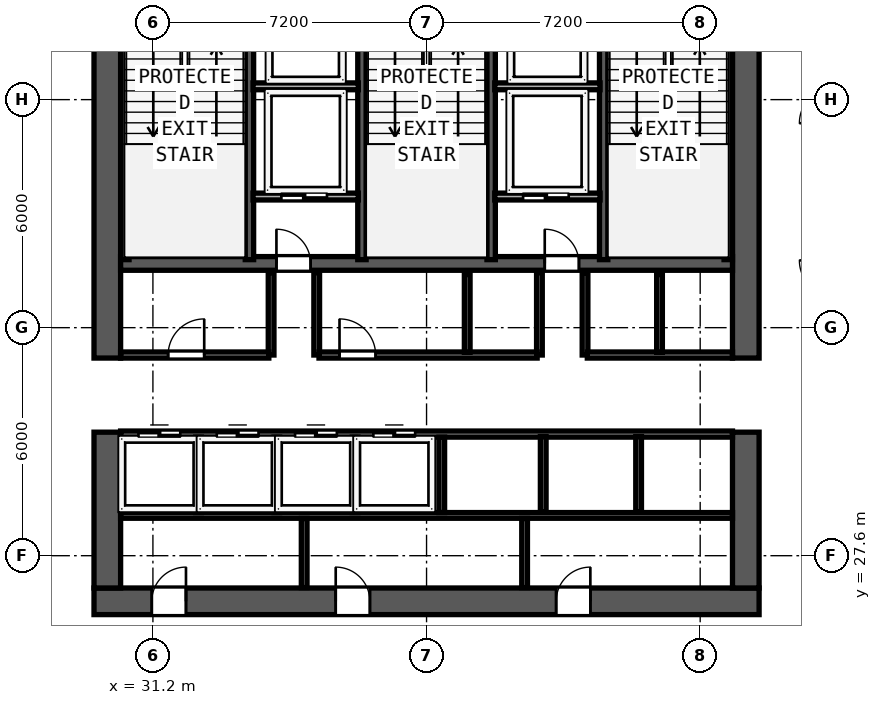
"""IFC4 building model, lengths in metres.
Left out: names, types, materials, properties, quantities, classifications, styles, units other than length and angle.
Written with IfcOpenShell. Run it as: python <this file> out.ifc"""

import sys

from ifc_helpers import new_model, si_unit, direction, frame, frame_2d, origin, place, context, subcontext, project, spatial, rectangle, extrude, element, fill, save


model = new_model("IFC4")
c1 = context("Model", 3, precision=1e-05, world=origin(), true_north=direction((0.0, 1.0)))
c2 = subcontext(c1, "Body", "Model", "MODEL_VIEW")
j1 = project(units=[si_unit("LENGTHUNIT", "METRE"), si_unit("PLANEANGLEUNIT", "RADIAN")], contexts=[c1])
p1 = place(None, origin())
s1 = spatial("IfcSite", under=j1, at=p1, CompositionType="ELEMENT")
p2 = place(p1, origin())
s2 = spatial("IfcBuilding", under=s1, at=p2, CompositionType="ELEMENT")
p3 = place(p2, frame((0.0, 0.0, 144.8)))
s3 = spatial("IfcBuildingStorey", under=s2, at=p3, CompositionType="ELEMENT", Elevation=144.8)
p4 = place(p3, frame((29.65, 26.4, 0.0), z_axis=(0.0, 0.0, 1.0), x_axis=(1.0, 0.0, 0.0)))
e1 = element("IfcWall", 1, at=p4, inside=s3, PredefinedType="SHEAR", context=c2, shape_type="SweptSolid", body=[
    extrude(rectangle(XDim=17.5, YDim=0.7, at=frame_2d((8.75, 0.0))), origin(), (0.0, 0.0, 1.0), 3.6),
])
p5 = place(p4, frame((2.42, 0.0, 0.0), z_axis=(0.0, 0.0, 1.0), x_axis=(-1.0, 0.0, 0.0)))
e2 = element("IfcOpeningElement", 2, at=p5, cuts=e1, PredefinedType="OPENING", context=c2, shape_type="SweptSolid", body=[
    extrude(rectangle(XDim=0.9, YDim=2.1, at=frame_2d((0.45, 1.05))), frame((0.0, 0.36, 0.0), z_axis=(0.0, -1.0, 0.0), x_axis=(1.0, 0.0, 0.0)), (0.0, 0.0, 1.0), 0.72),
])
p6 = place(p4, frame((7.26, 0.0, 0.0), z_axis=(0.0, 0.0, 1.0), x_axis=(-1.0, 0.0, 0.0)))
e3 = element("IfcOpeningElement", 3, at=p6, cuts=e1, PredefinedType="OPENING", context=c2, shape_type="SweptSolid", body=[
    extrude(rectangle(XDim=0.9, YDim=2.1, at=frame_2d((0.45, 1.05))), frame((0.0, 0.36, 0.0), z_axis=(0.0, -1.0, 0.0), x_axis=(1.0, 0.0, 0.0)), (0.0, 0.0, 1.0), 0.72),
])
p7 = place(p4, frame((13.06, 0.0, 0.0), z_axis=(0.0, 0.0, 1.0), x_axis=(-1.0, 0.0, 0.0)))
e4 = element("IfcOpeningElement", 4, at=p7, cuts=e1, PredefinedType="OPENING", context=c2, shape_type="SweptSolid", body=[
    extrude(rectangle(XDim=0.9, YDim=2.1, at=frame_2d((0.45, 1.05))), frame((0.0, 0.36, 0.0), z_axis=(0.0, -1.0, 0.0), x_axis=(1.0, 0.0, 0.0)), (0.0, 0.0, 1.0), 0.72),
])
p8 = place(p3, frame((30.0, 26.75, 0.0), z_axis=(0.0, 0.0, 1.0), x_axis=(0.0, 1.0, 0.0)))
e5 = element("IfcWall", 5, at=p8, inside=s3, PredefinedType="SHEAR", context=c2, shape_type="SweptSolid", body=[
    extrude(rectangle(XDim=4.1, YDim=0.7, at=frame_2d((2.05, 0.0))), origin(), (0.0, 0.0, 1.0), 3.6),
])
p9 = place(p3, frame((30.0, 32.8, 0.0), z_axis=(0.0, 0.0, 1.0), x_axis=(0.0, 1.0, 0.0)))
e6 = element("IfcWall", 6, at=p9, inside=s3, PredefinedType="SHEAR", context=c2, shape_type="SweptSolid", body=[
    extrude(rectangle(XDim=10.05, YDim=0.7, at=frame_2d((5.025, 0.0))), origin(), (0.0, 0.0, 1.0), 3.6),
])
p10 = place(p3, frame((46.8, 26.75, 0.0), z_axis=(0.0, 0.0, 1.0), x_axis=(0.0, 1.0, 0.0)))
e7 = element("IfcWall", 7, at=p10, inside=s3, PredefinedType="SHEAR", context=c2, shape_type="SweptSolid", body=[
    extrude(rectangle(XDim=4.1, YDim=0.7, at=frame_2d((2.05, 0.0))), origin(), (0.0, 0.0, 1.0), 3.6),
])
p11 = place(p3, frame((46.8, 32.8, 0.0), z_axis=(0.0, 0.0, 1.0), x_axis=(0.0, 1.0, 0.0)))
e8 = element("IfcWall", 8, at=p11, inside=s3, PredefinedType="SHEAR", context=c2, shape_type="SweptSolid", body=[
    extrude(rectangle(XDim=10.05, YDim=0.7, at=frame_2d((5.025, 0.0))), origin(), (0.0, 0.0, 1.0), 3.6),
])
p12 = place(p3, frame((30.35, 35.29, 0.0), z_axis=(0.0, 0.0, 1.0), x_axis=(1.0, 0.0, 0.0)))
e9 = element("IfcWall", 9, at=p12, inside=s3, PredefinedType="SHEAR", context=c2, shape_type="SweptSolid", body=[
    extrude(rectangle(XDim=16.1, YDim=0.36, at=frame_2d((8.05, 0.0))), origin(), (0.0, 0.0, 1.0), 3.6),
])
p13 = place(p12, frame((5.0, 0.0, 0.0), z_axis=(0.0, 0.0, 1.0), x_axis=(-1.0, 0.0, 0.0)))
e10 = element("IfcOpeningElement", 10, at=p13, cuts=e9, PredefinedType="OPENING", context=c2, shape_type="SweptSolid", body=[
    extrude(rectangle(XDim=0.9, YDim=2.1, at=frame_2d((0.45, 1.05))), frame((0.0, 0.19, 0.0), z_axis=(0.0, -1.0, 0.0), x_axis=(1.0, 0.0, 0.0)), (0.0, 0.0, 1.0), 0.38),
])
p14 = place(p12, frame((12.06, 0.0, 0.0), z_axis=(0.0, 0.0, 1.0), x_axis=(-1.0, 0.0, 0.0)))
e11 = element("IfcOpeningElement", 11, at=p14, cuts=e9, PredefinedType="OPENING", context=c2, shape_type="SweptSolid", body=[
    extrude(rectangle(XDim=0.9, YDim=2.1, at=frame_2d((0.45, 1.05))), frame((0.0, 0.19, 0.0), z_axis=(0.0, -1.0, 0.0), x_axis=(1.0, 0.0, 0.0)), (0.0, 0.0, 1.0), 0.38),
])
for number, where, z_axis, x_axis in (
    (12, (30.462, 35.39, 0.0), (0.0, 0.0, 1.0), (0.0, 1.0, 0.0)),
    (13, (33.74, 35.39, 0.0), (0.0, 0.0, 1.0), (0.0, 1.0, 0.0)),
    (14, (36.7, 35.39, 0.0), (0.0, 0.0, 1.0), (0.0, 1.0, 0.0)),
    (15, (40.1, 35.39, 0.0), (0.0, 0.0, 1.0), (0.0, 1.0, 0.0)),
    (16, (43.06, 35.39, 0.0), (0.0, 0.0, 1.0), (0.0, 1.0, 0.0)),
    (17, (46.338, 35.39, 0.0), (0.0, 0.0, 1.0), (0.0, 1.0, 0.0)),
):
    element("IfcWall", number, at=place(p3, frame(where, z_axis=z_axis, x_axis=x_axis)), inside=s3, PredefinedType="SHEAR", context=c2, shape_type="SweptSolid", body=[
        extrude(rectangle(XDim=7.46, YDim=0.22, at=frame_2d((3.73, 0.0))), origin(), (0.0, 0.0, 1.0), 3.6),
    ])
for number, where, z_axis, x_axis in (
    (18, (33.835, 39.95, 0.0), (0.0, 0.0, 1.0), (1.0, 0.0, 0.0)),
    (19, (40.195, 39.95, 0.0), (0.0, 0.0, 1.0), (1.0, 0.0, 0.0)),
):
    element("IfcWall", number, at=place(p3, frame(where, z_axis=z_axis, x_axis=x_axis)), inside=s3, PredefinedType="SOLIDWALL", context=c2, shape_type="SweptSolid", body=[
        extrude(rectangle(XDim=2.77, YDim=0.18, at=frame_2d((1.385, 0.0))), origin(), (0.0, 0.0, 1.0), 3.6),
    ])
p15 = place(p3, frame((33.835, 37.05, 0.0), z_axis=(0.0, 0.0, 1.0), x_axis=(1.0, 0.0, 0.0)))
e20 = element("IfcWall", 20, at=p15, inside=s3, PredefinedType="SOLIDWALL", context=c2, shape_type="SweptSolid", body=[
    extrude(rectangle(XDim=2.77, YDim=0.18, at=frame_2d((1.385, 0.0))), origin(), (0.0, 0.0, 1.0), 3.6),
])
p16 = place(p15, frame((1.945, 0.0, 0.0), z_axis=(0.0, 0.0, 1.0), x_axis=(-1.0, 0.0, 0.0)))
e21 = element("IfcOpeningElement", 21, at=p16, cuts=e20, PredefinedType="OPENING", context=c2, shape_type="SweptSolid", body=[
    extrude(rectangle(XDim=1.2, YDim=2.2, at=frame_2d((0.6, 1.1))), frame((0.0, 0.1, 0.0), z_axis=(0.0, -1.0, 0.0), x_axis=(1.0, 0.0, 0.0)), (0.0, 0.0, 1.0), 0.2),
])
for number, where, z_axis, x_axis in (
    (22, (34.31, 32.88, 0.0), (0.0, 0.0, 1.0), (0.0, 1.0, 0.0)),
    (23, (35.51, 32.88, 0.0), (0.0, 0.0, 1.0), (0.0, 1.0, 0.0)),
):
    element("IfcWall", number, at=place(p3, frame(where, z_axis=z_axis, x_axis=x_axis)), inside=s3, PredefinedType="SOLIDWALL", context=c2, shape_type="SweptSolid", body=[
        extrude(rectangle(XDim=2.17, YDim=0.15, at=frame_2d((1.085, 0.0))), origin(), (0.0, 0.0, 1.0), 3.6),
    ])
p17 = place(p3, frame((40.195, 37.05, 0.0), z_axis=(0.0, 0.0, 1.0), x_axis=(1.0, 0.0, 0.0)))
e24 = element("IfcWall", 24, at=p17, inside=s3, PredefinedType="SOLIDWALL", context=c2, shape_type="SweptSolid", body=[
    extrude(rectangle(XDim=2.77, YDim=0.18, at=frame_2d((1.385, 0.0))), origin(), (0.0, 0.0, 1.0), 3.6),
])
p18 = place(p17, frame((1.945, 0.0, 0.0), z_axis=(0.0, 0.0, 1.0), x_axis=(-1.0, 0.0, 0.0)))
e25 = element("IfcOpeningElement", 25, at=p18, cuts=e24, PredefinedType="OPENING", context=c2, shape_type="SweptSolid", body=[
    extrude(rectangle(XDim=1.2, YDim=2.2, at=frame_2d((0.6, 1.1))), frame((0.0, 0.1, 0.0), z_axis=(0.0, -1.0, 0.0), x_axis=(1.0, 0.0, 0.0)), (0.0, 0.0, 1.0), 0.2),
])
for number, where, z_axis, x_axis in (
    (26, (41.37, 32.88, 0.0), (0.0, 0.0, 1.0), (0.0, 1.0, 0.0)),
    (27, (42.57, 32.88, 0.0), (0.0, 0.0, 1.0), (0.0, 1.0, 0.0)),
):
    element("IfcWall", number, at=place(p3, frame(where, z_axis=z_axis, x_axis=x_axis)), inside=s3, PredefinedType="SOLIDWALL", context=c2, shape_type="SweptSolid", body=[
        extrude(rectangle(XDim=2.17, YDim=0.15, at=frame_2d((1.085, 0.0))), origin(), (0.0, 0.0, 1.0), 3.6),
    ])
p19 = place(p3, frame((30.35, 32.88, 0.0), z_axis=(0.0, 0.0, 1.0), x_axis=(1.0, 0.0, 0.0)))
e28 = element("IfcWall", 28, at=p19, inside=s3, PredefinedType="SOLIDWALL", context=c2, shape_type="SweptSolid", body=[
    extrude(rectangle(XDim=3.9, YDim=0.16, at=frame_2d((1.95, 0.0))), origin(), (0.0, 0.0, 1.0), 3.6),
])
p20 = place(p19, frame((2.2, 0.0, 0.0), z_axis=(0.0, 0.0, 1.0), x_axis=(-1.0, 0.0, 0.0)))
e29 = element("IfcOpeningElement", 29, at=p20, cuts=e28, PredefinedType="OPENING", context=c2, shape_type="SweptSolid", body=[
    extrude(rectangle(XDim=0.95, YDim=2.12, at=frame_2d((0.475, 1.06))), frame((0.0, 0.09, 0.0), z_axis=(0.0, -1.0, 0.0), x_axis=(1.0, 0.0, 0.0)), (0.0, 0.0, 1.0), 0.18),
])
p21 = place(p3, frame((35.57, 32.88, 0.0), z_axis=(0.0, 0.0, 1.0), x_axis=(1.0, 0.0, 0.0)))
e30 = element("IfcWall", 30, at=p21, inside=s3, PredefinedType="SOLIDWALL", context=c2, shape_type="SweptSolid", body=[
    extrude(rectangle(XDim=5.74, YDim=0.16, at=frame_2d((2.87, 0.0))), origin(), (0.0, 0.0, 1.0), 3.6),
])
p22 = place(p21, frame((1.49, 0.0, 0.0), z_axis=(0.0, 0.0, 1.0), x_axis=(-1.0, 0.0, 0.0)))
e31 = element("IfcOpeningElement", 31, at=p22, cuts=e30, PredefinedType="OPENING", context=c2, shape_type="SweptSolid", body=[
    extrude(rectangle(XDim=0.95, YDim=2.12, at=frame_2d((0.475, 1.06))), frame((0.0, 0.09, 0.0), z_axis=(0.0, -1.0, 0.0), x_axis=(1.0, 0.0, 0.0)), (0.0, 0.0, 1.0), 0.18),
])
p23 = place(p3, frame((42.63, 32.88, 0.0), z_axis=(0.0, 0.0, 1.0), x_axis=(1.0, 0.0, 0.0)))
e32 = element("IfcWall", 32, at=p23, inside=s3, PredefinedType="SOLIDWALL", context=c2, shape_type="SweptSolid", body=[
    extrude(rectangle(XDim=3.82, YDim=0.16, at=frame_2d((1.91, 0.0))), origin(), (0.0, 0.0, 1.0), 3.6),
])
for number, where, z_axis, x_axis in (
    (33, (39.47, 32.95, 0.0), (0.0, 0.0, 1.0), (0.0, 1.0, 0.0)),
    (34, (44.53, 32.95, 0.0), (0.0, 0.0, 1.0), (0.0, 1.0, 0.0)),
):
    element("IfcWall", number, at=place(p3, frame(where, z_axis=z_axis, x_axis=x_axis)), inside=s3, PredefinedType="SOLIDWALL", context=c2, shape_type="SweptSolid", body=[
        extrude(rectangle(XDim=2.05, YDim=0.15, at=frame_2d((1.025, 0.0))), origin(), (0.0, 0.0, 1.0), 3.6),
    ])
p24 = place(p3, frame((30.35, 30.8, 0.0), z_axis=(0.0, 0.0, 1.0), x_axis=(1.0, 0.0, 0.0)))
e35 = element("IfcWall", 35, at=p24, inside=s3, PredefinedType="SOLIDWALL", context=c2, shape_type="SweptSolid", body=[
    extrude(rectangle(XDim=16.1, YDim=0.16, at=frame_2d((8.05, 0.0))), origin(), (0.0, 0.0, 1.0), 3.6),
])
p25 = place(p24, frame((0.47, 0.0, 0.0)))
e36 = element("IfcOpeningElement", 36, at=p25, cuts=e35, PredefinedType="OPENING", context=c2, shape_type="SweptSolid", body=[
    extrude(rectangle(XDim=1.1, YDim=2.2, at=frame_2d((0.55, 1.1))), frame((0.0, 0.09, 0.0), z_axis=(0.0, -1.0, 0.0), x_axis=(1.0, 0.0, 0.0)), (0.0, 0.0, 1.0), 0.18),
])
p26 = place(p24, frame((2.53, 0.0, 0.0)))
e37 = element("IfcOpeningElement", 37, at=p26, cuts=e35, PredefinedType="OPENING", context=c2, shape_type="SweptSolid", body=[
    extrude(rectangle(XDim=1.1, YDim=2.2, at=frame_2d((0.55, 1.1))), frame((0.0, 0.09, 0.0), z_axis=(0.0, -1.0, 0.0), x_axis=(1.0, 0.0, 0.0)), (0.0, 0.0, 1.0), 0.18),
])
p27 = place(p24, frame((4.59, 0.0, 0.0)))
e38 = element("IfcOpeningElement", 38, at=p27, cuts=e35, PredefinedType="OPENING", context=c2, shape_type="SweptSolid", body=[
    extrude(rectangle(XDim=1.1, YDim=2.2, at=frame_2d((0.55, 1.1))), frame((0.0, 0.09, 0.0), z_axis=(0.0, -1.0, 0.0), x_axis=(1.0, 0.0, 0.0)), (0.0, 0.0, 1.0), 0.18),
])
p28 = place(p24, frame((6.65, 0.0, 0.0)))
e39 = element("IfcOpeningElement", 39, at=p28, cuts=e35, PredefinedType="OPENING", context=c2, shape_type="SweptSolid", body=[
    extrude(rectangle(XDim=1.1, YDim=2.2, at=frame_2d((0.55, 1.1))), frame((0.0, 0.09, 0.0), z_axis=(0.0, -1.0, 0.0), x_axis=(1.0, 0.0, 0.0)), (0.0, 0.0, 1.0), 0.18),
])
p29 = place(p3, frame((30.35, 28.66, 0.0), z_axis=(0.0, 0.0, 1.0), x_axis=(1.0, 0.0, 0.0)))
e40 = element("IfcWall", 40, at=p29, inside=s3, PredefinedType="PARTITIONING", context=c2, shape_type="SweptSolid", body=[
    extrude(rectangle(XDim=16.1, YDim=0.15, at=frame_2d((8.05, 0.0))), origin(), (0.0, 0.0, 1.0), 3.6),
])
for number, where, z_axis, x_axis in (
    (41, (32.4, 28.735, 0.0), (0.0, 0.0, 1.0), (0.0, 1.0, 0.0)),
    (42, (34.46, 28.735, 0.0), (0.0, 0.0, 1.0), (0.0, 1.0, 0.0)),
    (43, (36.52, 28.735, 0.0), (0.0, 0.0, 1.0), (0.0, 1.0, 0.0)),
    (44, (38.8, 28.735, 0.0), (0.0, 0.0, 1.0), (0.0, 1.0, 0.0)),
):
    element("IfcWall", number, at=place(p3, frame(where, z_axis=z_axis, x_axis=x_axis)), inside=s3, PredefinedType="SOLIDWALL", context=c2, shape_type="SweptSolid", body=[
        extrude(rectangle(XDim=1.985, YDim=0.15, at=frame_2d((0.992, 0.0))), origin(), (0.0, 0.0, 1.0), 3.6),
    ])
for number, where, z_axis, x_axis in (
    (45, (35.18, 26.76, 0.0), (0.0, 0.0, 1.0), (0.0, 1.0, 0.0)),
    (46, (40.98, 26.76, 0.0), (0.0, 0.0, 1.0), (0.0, 1.0, 0.0)),
):
    element("IfcWall", number, at=place(p3, frame(where, z_axis=z_axis, x_axis=x_axis)), inside=s3, PredefinedType="PARTITIONING", context=c2, shape_type="SweptSolid", body=[
        extrude(rectangle(XDim=1.82, YDim=0.15, at=frame_2d((0.91, 0.0))), origin(), (0.0, 0.0, 1.0), 3.6),
    ])
for number, where, z_axis, x_axis in (
    (47, (41.47, 28.75, 0.0), (0.0, 0.0, 1.0), (0.0, 1.0, 0.0)),
    (48, (43.98, 28.75, 0.0), (0.0, 0.0, 1.0), (0.0, 1.0, 0.0)),
):
    element("IfcWall", number, at=place(p3, frame(where, z_axis=z_axis, x_axis=x_axis)), inside=s3, PredefinedType="SOLIDWALL", context=c2, shape_type="SweptSolid", body=[
        extrude(rectangle(XDim=1.985, YDim=0.15, at=frame_2d((0.993, 0.0))), origin(), (0.0, 0.0, 1.0), 3.6),
    ])
p30 = place(p16, origin())
e49 = element("IfcDoor", 49, at=p30, inside=s3, OperationType="SLIDING_TO_RIGHT", PredefinedType="DOOR", context=c2, shape_type="SweptSolid", body=[
    extrude(rectangle(XDim=1.2, YDim=2.2, at=frame_2d((0.6, 1.1))), frame((0.0, 0.025, 0.0), z_axis=(0.0, -1.0, 0.0), x_axis=(1.0, 0.0, 0.0)), (0.0, 0.0, 1.0), 0.05),
])
fill(e21, e49)
p31 = place(p13, origin())
e50 = element("IfcDoor", 50, at=p31, inside=s3, OperationType="SINGLE_SWING_RIGHT", PredefinedType="DOOR", context=c2, shape_type="SweptSolid", body=[
    extrude(rectangle(XDim=0.9, YDim=2.1, at=frame_2d((0.45, 1.05))), frame((0.0, 0.025, 0.0), z_axis=(0.0, -1.0, 0.0), x_axis=(1.0, 0.0, 0.0)), (0.0, 0.0, 1.0), 0.05),
])
fill(e10, e50)
p32 = place(p18, origin())
e51 = element("IfcDoor", 51, at=p32, inside=s3, OperationType="SLIDING_TO_RIGHT", PredefinedType="DOOR", context=c2, shape_type="SweptSolid", body=[
    extrude(rectangle(XDim=1.2, YDim=2.2, at=frame_2d((0.6, 1.1))), frame((0.0, 0.025, 0.0), z_axis=(0.0, -1.0, 0.0), x_axis=(1.0, 0.0, 0.0)), (0.0, 0.0, 1.0), 0.05),
])
fill(e25, e51)
p33 = place(p14, origin())
e52 = element("IfcDoor", 52, at=p33, inside=s3, OperationType="SINGLE_SWING_RIGHT", PredefinedType="DOOR", context=c2, shape_type="SweptSolid", body=[
    extrude(rectangle(XDim=0.9, YDim=2.1, at=frame_2d((0.45, 1.05))), frame((0.0, 0.025, 0.0), z_axis=(0.0, -1.0, 0.0), x_axis=(1.0, 0.0, 0.0)), (0.0, 0.0, 1.0), 0.05),
])
fill(e11, e52)
p34 = place(p20, origin())
e53 = element("IfcDoor", 53, at=p34, inside=s3, OperationType="SINGLE_SWING_LEFT", PredefinedType="DOOR", context=c2, shape_type="SweptSolid", body=[
    extrude(rectangle(XDim=0.95, YDim=2.12, at=frame_2d((0.475, 1.06))), frame((0.0, 0.025, 0.0), z_axis=(0.0, -1.0, 0.0), x_axis=(1.0, 0.0, 0.0)), (0.0, 0.0, 1.0), 0.05),
])
fill(e29, e53)
p35 = place(p22, origin())
e54 = element("IfcDoor", 54, at=p35, inside=s3, OperationType="SINGLE_SWING_RIGHT", PredefinedType="DOOR", context=c2, shape_type="SweptSolid", body=[
    extrude(rectangle(XDim=0.95, YDim=2.12, at=frame_2d((0.475, 1.06))), frame((0.0, 0.025, 0.0), z_axis=(0.0, -1.0, 0.0), x_axis=(1.0, 0.0, 0.0)), (0.0, 0.0, 1.0), 0.05),
])
fill(e31, e54)
p36 = place(p25, origin())
e55 = element("IfcDoor", 55, at=p36, inside=s3, OperationType="SLIDING_TO_LEFT", PredefinedType="DOOR", context=c2, shape_type="SweptSolid", body=[
    extrude(rectangle(XDim=1.1, YDim=2.2, at=frame_2d((0.55, 1.1))), frame((0.0, 0.025, 0.0), z_axis=(0.0, -1.0, 0.0), x_axis=(1.0, 0.0, 0.0)), (0.0, 0.0, 1.0), 0.05),
])
fill(e36, e55)
p37 = place(p26, origin())
e56 = element("IfcDoor", 56, at=p37, inside=s3, OperationType="SLIDING_TO_LEFT", PredefinedType="DOOR", context=c2, shape_type="SweptSolid", body=[
    extrude(rectangle(XDim=1.1, YDim=2.2, at=frame_2d((0.55, 1.1))), frame((0.0, 0.025, 0.0), z_axis=(0.0, -1.0, 0.0), x_axis=(1.0, 0.0, 0.0)), (0.0, 0.0, 1.0), 0.05),
])
fill(e37, e56)
p38 = place(p27, origin())
e57 = element("IfcDoor", 57, at=p38, inside=s3, OperationType="SLIDING_TO_LEFT", PredefinedType="DOOR", context=c2, shape_type="SweptSolid", body=[
    extrude(rectangle(XDim=1.1, YDim=2.2, at=frame_2d((0.55, 1.1))), frame((0.0, 0.025, 0.0), z_axis=(0.0, -1.0, 0.0), x_axis=(1.0, 0.0, 0.0)), (0.0, 0.0, 1.0), 0.05),
])
fill(e38, e57)
p39 = place(p28, origin())
e58 = element("IfcDoor", 58, at=p39, inside=s3, OperationType="SLIDING_TO_LEFT", PredefinedType="DOOR", context=c2, shape_type="SweptSolid", body=[
    extrude(rectangle(XDim=1.1, YDim=2.2, at=frame_2d((0.55, 1.1))), frame((0.0, 0.025, 0.0), z_axis=(0.0, -1.0, 0.0), x_axis=(1.0, 0.0, 0.0)), (0.0, 0.0, 1.0), 0.05),
])
fill(e39, e58)
p40 = place(p5, origin())
e59 = element("IfcDoor", 59, at=p40, inside=s3, OperationType="SINGLE_SWING_LEFT", PredefinedType="DOOR", context=c2, shape_type="SweptSolid", body=[
    extrude(rectangle(XDim=0.9, YDim=2.1, at=frame_2d((0.45, 1.05))), frame((0.0, -0.195, 0.0), z_axis=(0.0, -1.0, 0.0), x_axis=(1.0, 0.0, 0.0)), (0.0, 0.0, 1.0), 0.05),
])
fill(e2, e59)
p41 = place(p6, origin())
e60 = element("IfcDoor", 60, at=p41, inside=s3, OperationType="SINGLE_SWING_RIGHT", PredefinedType="DOOR", context=c2, shape_type="SweptSolid", body=[
    extrude(rectangle(XDim=0.9, YDim=2.1, at=frame_2d((0.45, 1.05))), frame((0.0, -0.195, 0.0), z_axis=(0.0, -1.0, 0.0), x_axis=(1.0, 0.0, 0.0)), (0.0, 0.0, 1.0), 0.05),
])
fill(e3, e60)
p42 = place(p7, origin())
e61 = element("IfcDoor", 61, at=p42, inside=s3, OperationType="SINGLE_SWING_LEFT", PredefinedType="DOOR", context=c2, shape_type="SweptSolid", body=[
    extrude(rectangle(XDim=0.9, YDim=2.1, at=frame_2d((0.45, 1.05))), frame((0.0, -0.195, 0.0), z_axis=(0.0, -1.0, 0.0), x_axis=(1.0, 0.0, 0.0)), (0.0, 0.0, 1.0), 0.05),
])
fill(e4, e61)
save(model, sys.argv[1])
